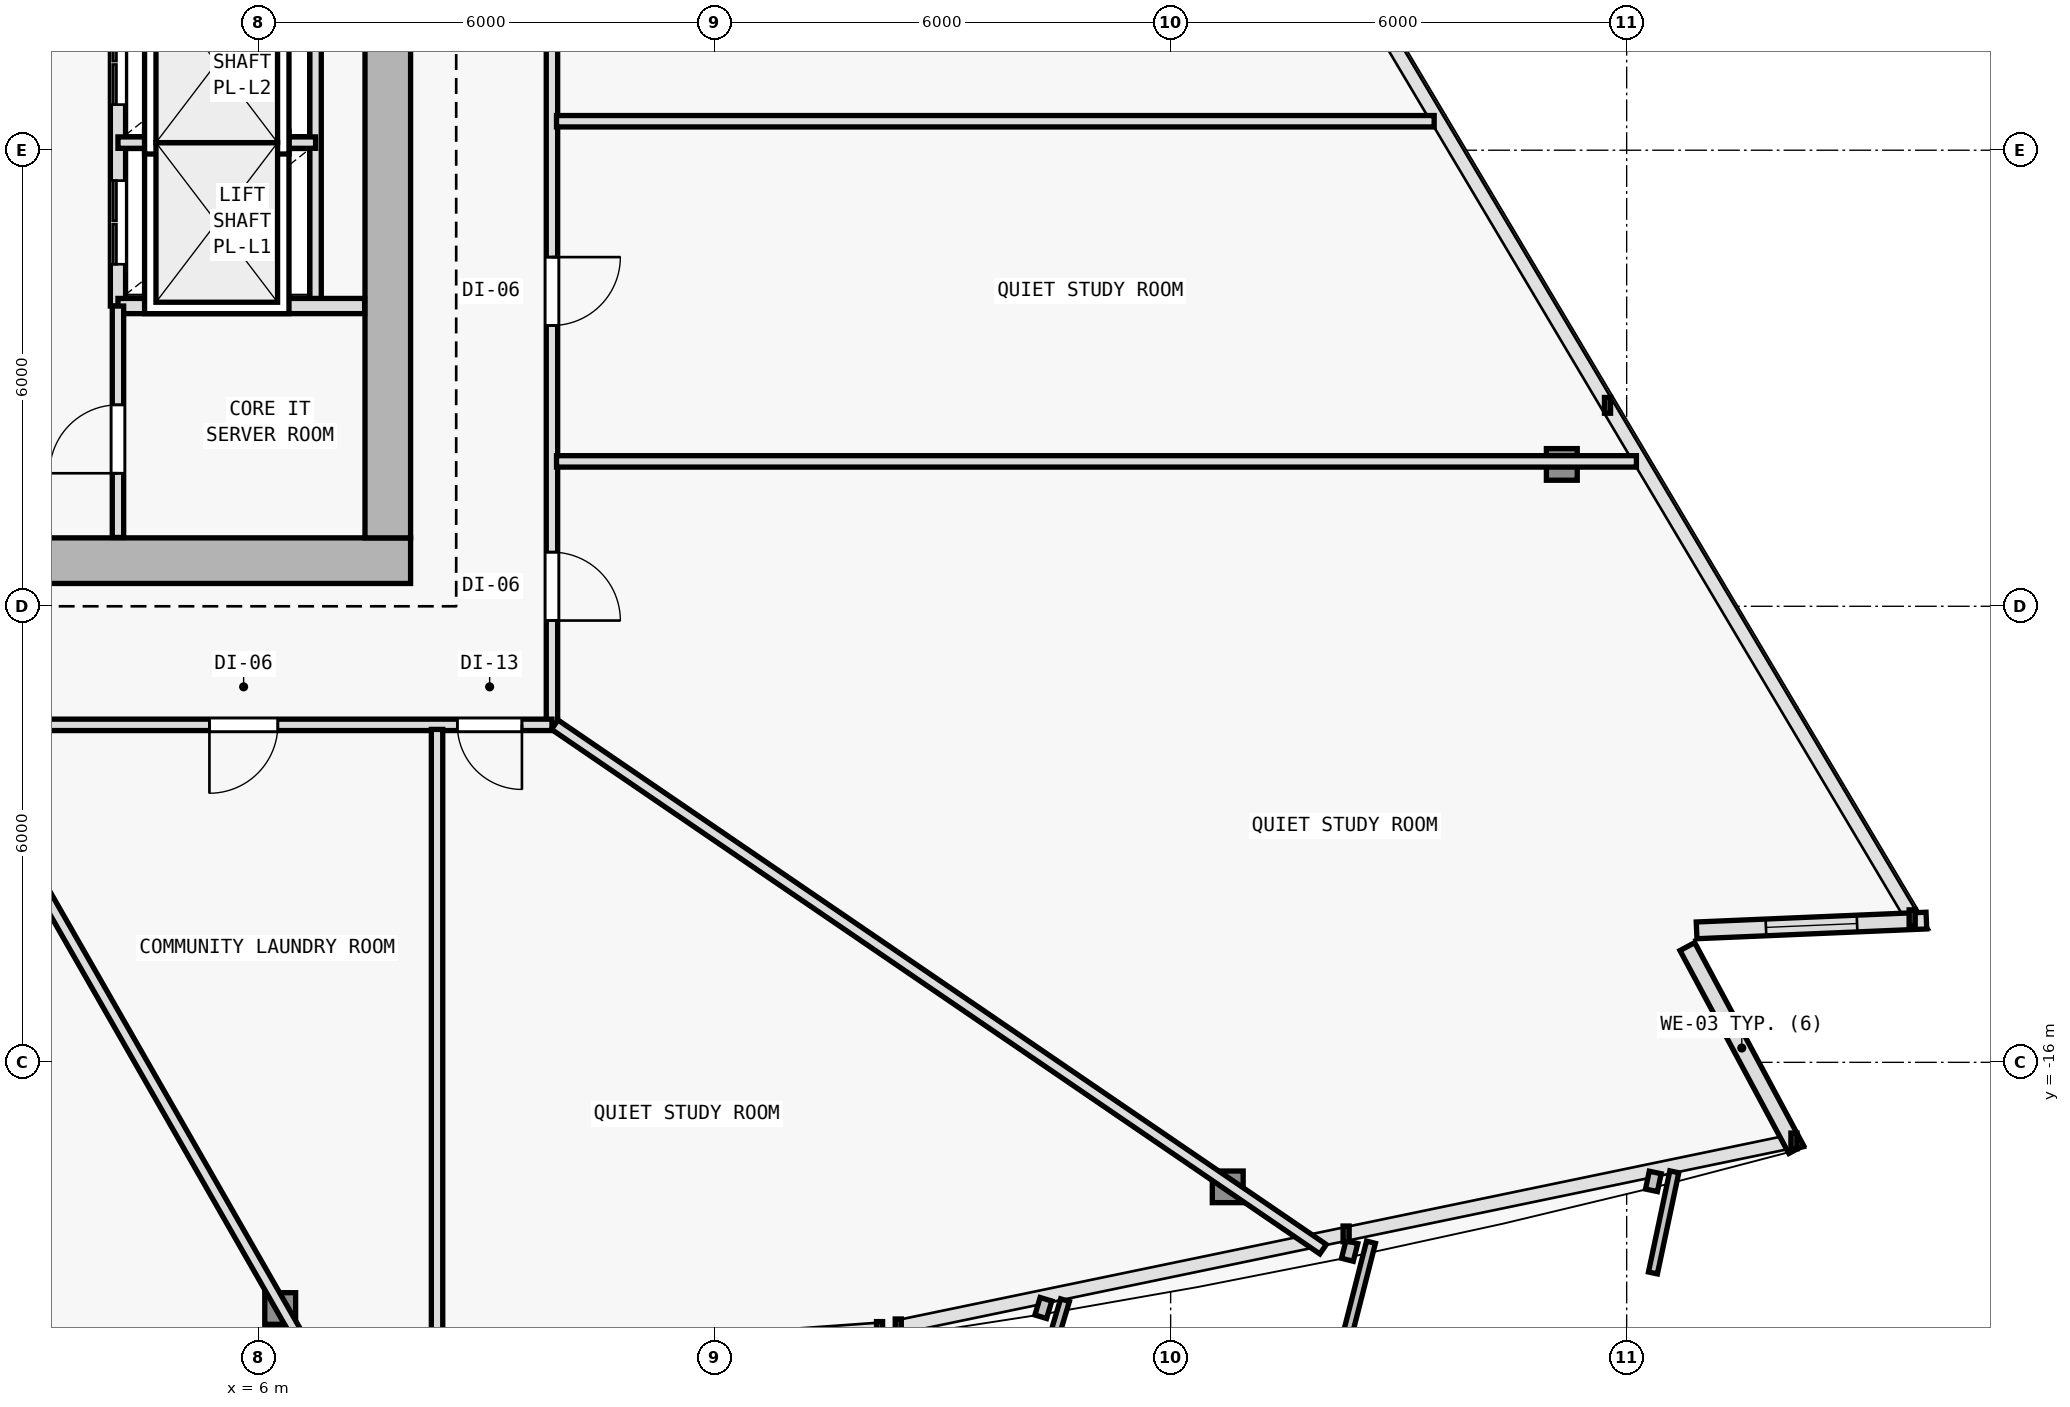
"""IFC4 building model, lengths in metres.
Left out: names, types, materials, properties, quantities, classifications, styles, units other than length and angle.
Written with IfcOpenShell. Run it as: python <this file> out.ifc"""

import sys

from ifc_helpers import new_model, si_unit, direction, frame, frame_2d, origin, origin_2d, place, context, subcontext, project, spatial, rectangle, i_section, extrude, element, fill, save


model = new_model("IFC4")
c1 = context("Model", 3, precision=1e-05, world=origin(), true_north=direction((0.0, 1.0)))
c2 = subcontext(c1, "Body", "Model", "MODEL_VIEW")
j1 = project(units=[si_unit("LENGTHUNIT", "METRE"), si_unit("PLANEANGLEUNIT", "RADIAN")], contexts=[c1])
p1 = place(None, origin())
s1 = spatial("IfcSite", under=j1, at=p1, CompositionType="ELEMENT")
p2 = place(p1, origin())
s2 = spatial("IfcBuilding", under=s1, at=p2, CompositionType="ELEMENT")
p3 = place(p2, frame((0.0, 0.0, 107.7)))
s3 = spatial("IfcBuildingStorey", under=s2, at=p3, CompositionType="ELEMENT", Elevation=107.7)
p4 = place(p3, frame((7.7, -9.4, 0.0), z_axis=(0.0, 0.0, 1.0), x_axis=(1.0, 0.0, 0.0)))
e1 = element("IfcColumn", 1, at=p4, inside=s3, PredefinedType="COLUMN", context=c2, shape_type="SweptSolid", body=[
    extrude(i_section(OverallWidth=0.409, OverallDepth=0.425, WebThickness=0.021, FlangeThickness=0.034, FilletRadius=0.015, at=origin_2d()), origin(), (0.0, 0.0, 1.0), 3.6),
])
p5 = place(p3, frame((6.284, -19.239, 0.006), z_axis=(-0.007070007243, 0.036233787122, 0.999318331498), x_axis=(-0.981490592026, -0.19151035942, 0.0)))
e2 = element("IfcColumn", 2, at=p5, inside=s3, PredefinedType="COLUMN", context=c2, shape_type="SweptSolid", body=[
    extrude(i_section(OverallWidth=0.406, OverallDepth=0.416, WebThickness=0.019, FlangeThickness=0.031, FilletRadius=0.015, at=origin_2d()), origin(), (0.0, 0.0, 1.0), 3.591),
])
p6 = place(p3, frame((18.751, -17.638, 0.006), z_axis=(-0.021207156454, 0.034393657583, 0.999183332944), x_axis=(-0.851195920716, -0.524848077596, 0.0)))
e3 = element("IfcColumn", 3, at=p6, inside=s3, PredefinedType="COLUMN", context=c2, shape_type="SweptSolid", body=[
    extrude(i_section(OverallWidth=0.406, OverallDepth=0.416, WebThickness=0.019, FlangeThickness=0.031, FilletRadius=0.015, at=origin_2d()), origin(), (0.0, 0.0, 1.0), 3.592),
])
p7 = place(p3, frame((23.147, -8.134, 0.006), z_axis=(-0.026854414067, 0.022231375696, 0.99939211843), x_axis=(-0.637687438134, -0.770295223434, 0.0)))
e4 = element("IfcColumn", 4, at=p7, inside=s3, PredefinedType="COLUMN", context=c2, shape_type="SweptSolid", body=[
    extrude(i_section(OverallWidth=0.406, OverallDepth=0.416, WebThickness=0.019, FlangeThickness=0.031, FilletRadius=0.015, at=origin_2d()), origin(), (0.0, 0.0, 1.0), 3.591),
])
p8 = place(p3, frame((24.798, -14.477, 0.0), z_axis=(0.0, 0.0, 1.0), x_axis=(0.472820757697, -0.881158629925, 0.0)))
e5 = element("IfcWall", 5, at=p8, inside=s3, PredefinedType="SOLIDWALL", context=c2, shape_type="SweptSolid", body=[
    extrude(rectangle(XDim=3.029, YDim=0.22, at=frame_2d((1.514, 0.0))), origin(), (0.0, 0.0, 1.0), 3.35),
])
p9 = place(p3, frame((27.943, -14.135, 0.0), z_axis=(0.0, 0.0, 1.0), x_axis=(-0.999095621918, -0.042519857284, 0.0)))
e6 = element("IfcWall", 6, at=p9, inside=s3, PredefinedType="SOLIDWALL", context=c2, shape_type="SweptSolid", body=[
    extrude(rectangle(XDim=3.026, YDim=0.22, at=frame_2d((1.513, 0.0))), origin(), (0.0, 0.0, 1.0), 3.35),
])
p10 = place(p9, frame((0.913, 0.0, 0.62)))
e7 = element("IfcOpeningElement", 7, at=p10, cuts=e6, PredefinedType="OPENING", context=c2, shape_type="SweptSolid", body=[
    extrude(rectangle(XDim=1.2, YDim=1.8, at=frame_2d((0.6, 0.9))), frame((0.0, 0.12, 0.0), z_axis=(0.0, -1.0, 0.0), x_axis=(1.0, 0.0, 0.0)), (0.0, 0.0, 1.0), 0.24),
])
p11 = place(p3, frame((-8.0, -9.4, 0.0), z_axis=(0.0, 0.0, 1.0), x_axis=(1.0, 0.0, 0.0)))
e8 = element("IfcWall", 8, at=p11, inside=s3, PredefinedType="SHEAR", context=c2, shape_type="SweptSolid", body=[
    extrude(rectangle(XDim=16.0, YDim=0.6, at=frame_2d((8.0, 0.0))), origin(), (0.0, 0.0, 1.0), 3.35),
])
p12 = place(p11, frame((9.65, 0.0, 0.0)))
e9 = element("IfcOpeningElement", 9, at=p12, cuts=e8, PredefinedType="OPENING", context=c2, shape_type="SweptSolid", body=[
    extrude(rectangle(XDim=1.5, YDim=2.2, at=frame_2d((0.75, 1.1))), frame((0.0, 0.31, 0.0), z_axis=(0.0, -1.0, 0.0), x_axis=(1.0, 0.0, 0.0)), (0.0, 0.0, 1.0), 0.62),
])
p13 = place(p3, frame((7.7, 9.9, 0.0), z_axis=(0.0, 0.0, 1.0), x_axis=(0.0, -1.0, 0.0)))
e10 = element("IfcWall", 10, at=p13, inside=s3, PredefinedType="SHEAR", context=c2, shape_type="SweptSolid", body=[
    extrude(rectangle(XDim=19.0, YDim=0.6, at=frame_2d((9.5, 0.0))), origin(), (0.0, 0.0, 1.0), 3.35),
])
p14 = place(p3, frame((4.15, -6.05, 0.0), z_axis=(0.0, 0.0, 1.0), x_axis=(0.0, 1.0, 0.0)))
e11 = element("IfcWall", 11, at=p14, inside=s3, PredefinedType="SOLIDWALL", context=c2, shape_type="SweptSolid", body=[
    extrude(rectangle(XDim=8.7, YDim=0.2, at=frame_2d((4.35, 0.0))), origin(), (0.0, 0.0, 1.0), 3.35),
])
p15 = place(p14, frame((0.55, 0.0, 0.0)))
e12 = element("IfcOpeningElement", 12, at=p15, cuts=e11, PredefinedType="OPENING", context=c2, shape_type="SweptSolid", body=[
    extrude(rectangle(XDim=1.1, YDim=2.15, at=frame_2d((0.55, 1.075))), frame((0.0, 0.11, 0.0), z_axis=(0.0, -1.0, 0.0), x_axis=(1.0, 0.0, 0.0)), (0.0, 0.0, 1.0), 0.22),
])
p16 = place(p14, frame((2.65, 0.0, 0.0)))
e13 = element("IfcOpeningElement", 13, at=p16, cuts=e11, PredefinedType="OPENING", context=c2, shape_type="SweptSolid", body=[
    extrude(rectangle(XDim=1.1, YDim=2.15, at=frame_2d((0.55, 1.075))), frame((0.0, 0.11, 0.0), z_axis=(0.0, -1.0, 0.0), x_axis=(1.0, 0.0, 0.0)), (0.0, 0.0, 1.0), 0.22),
])
p17 = place(p14, frame((4.75, 0.0, 0.0)))
e14 = element("IfcOpeningElement", 14, at=p17, cuts=e11, PredefinedType="OPENING", context=c2, shape_type="SweptSolid", body=[
    extrude(rectangle(XDim=1.1, YDim=2.15, at=frame_2d((0.55, 1.075))), frame((0.0, 0.11, 0.0), z_axis=(0.0, -1.0, 0.0), x_axis=(1.0, 0.0, 0.0)), (0.0, 0.0, 1.0), 0.22),
])
p18 = place(p14, frame((6.85, 0.0, 0.0)))
e15 = element("IfcOpeningElement", 15, at=p18, cuts=e11, PredefinedType="OPENING", context=c2, shape_type="SweptSolid", body=[
    extrude(rectangle(XDim=1.1, YDim=2.15, at=frame_2d((0.55, 1.075))), frame((0.0, 0.11, 0.0), z_axis=(0.0, -1.0, 0.0), x_axis=(1.0, 0.0, 0.0)), (0.0, 0.0, 1.0), 0.22),
])
p19 = place(p3, frame((6.75, -6.05, 0.0), z_axis=(0.0, 0.0, 1.0), x_axis=(0.0, 1.0, 0.0)))
e16 = element("IfcWall", 16, at=p19, inside=s3, PredefinedType="PARTITIONING", context=c2, shape_type="SweptSolid", body=[
    extrude(rectangle(XDim=8.7, YDim=0.15, at=frame_2d((4.35, 0.0))), origin(), (0.0, 0.0, 1.0), 3.35),
])
p20 = place(p3, frame((4.15, -3.9, 0.0), z_axis=(0.0, 0.0, 1.0), x_axis=(1.0, 0.0, 0.0)))
e17 = element("IfcWall", 17, at=p20, inside=s3, PredefinedType="PARTITIONING", context=c2, shape_type="SweptSolid", body=[
    extrude(rectangle(XDim=2.6, YDim=0.15, at=frame_2d((1.3, 0.0))), origin(), (0.0, 0.0, 1.0), 3.35),
])
p21 = place(p3, frame((4.15, -6.05, 0.0), z_axis=(0.0, 0.0, 1.0), x_axis=(1.0, 0.0, 0.0)))
e18 = element("IfcWall", 18, at=p21, inside=s3, PredefinedType="SOLIDWALL", context=c2, shape_type="SweptSolid", body=[
    extrude(rectangle(XDim=3.245, YDim=0.2, at=frame_2d((1.623, 0.0))), origin(), (0.0, 0.0, 1.0), 3.35),
])
p22 = place(p3, frame((4.15, -9.095, 0.0), z_axis=(0.0, 0.0, 1.0), x_axis=(0.0, 1.0, 0.0)))
e19 = element("IfcWall", 19, at=p22, inside=s3, PredefinedType="PARTITIONING", context=c2, shape_type="SweptSolid", body=[
    extrude(rectangle(XDim=3.045, YDim=0.15, at=frame_2d((1.522, 0.0))), origin(), (0.0, 0.0, 1.0), 3.35),
])
p23 = place(p22, frame((0.845, 0.0, 0.0)))
e20 = element("IfcOpeningElement", 20, at=p23, cuts=e19, PredefinedType="OPENING", context=c2, shape_type="SweptSolid", body=[
    extrude(rectangle(XDim=0.9, YDim=2.1, at=frame_2d((0.45, 1.05))), frame((0.0, 0.085, 0.0), z_axis=(0.0, -1.0, 0.0), x_axis=(1.0, 0.0, 0.0)), (0.0, 0.0, 1.0), 0.17),
])
p24 = place(p3, frame((9.86, 8.426, 0.0), z_axis=(0.0, 0.0, 1.0), x_axis=(0.0, -1.0, 0.0)))
e21 = element("IfcWall", 21, at=p24, inside=s3, PredefinedType="PARTITIONING", context=c2, shape_type="SweptSolid", body=[
    extrude(rectangle(XDim=19.986, YDim=0.15, at=frame_2d((9.993, 0.0))), origin(), (0.0, 0.0, 1.0), 2.705),
])
p25 = place(p24, frame((17.713, 0.0, 0.0)))
e22 = element("IfcOpeningElement", 22, at=p25, cuts=e21, PredefinedType="OPENING", context=c2, shape_type="SweptSolid", body=[
    extrude(rectangle(XDim=0.9, YDim=2.1, at=frame_2d((0.45, 1.05))), frame((0.0, 0.085, 0.0), z_axis=(0.0, -1.0, 0.0), x_axis=(1.0, 0.0, 0.0)), (0.0, 0.0, 1.0), 0.17),
])
p26 = place(p24, frame((13.832, 0.0, 0.0)))
e23 = element("IfcOpeningElement", 23, at=p26, cuts=e21, PredefinedType="OPENING", context=c2, shape_type="SweptSolid", body=[
    extrude(rectangle(XDim=0.9, YDim=2.1, at=frame_2d((0.45, 1.05))), frame((0.0, 0.085, 0.0), z_axis=(0.0, -1.0, 0.0), x_axis=(1.0, 0.0, 0.0)), (0.0, 0.0, 1.0), 0.17),
])
p27 = place(p24, frame((9.722, 0.0, 0.0)))
e24 = element("IfcOpeningElement", 24, at=p27, cuts=e21, PredefinedType="OPENING", context=c2, shape_type="SweptSolid", body=[
    extrude(rectangle(XDim=0.9, YDim=2.1, at=frame_2d((0.45, 1.05))), frame((0.0, 0.085, 0.0), z_axis=(0.0, -1.0, 0.0), x_axis=(1.0, 0.0, 0.0)), (0.0, 0.0, 1.0), 0.17),
])
p28 = place(p24, frame((5.796, 0.0, 0.0)))
e25 = element("IfcOpeningElement", 25, at=p28, cuts=e21, PredefinedType="OPENING", context=c2, shape_type="SweptSolid", body=[
    extrude(rectangle(XDim=0.9, YDim=2.1, at=frame_2d((0.45, 1.05))), frame((0.0, 0.085, 0.0), z_axis=(0.0, -1.0, 0.0), x_axis=(1.0, 0.0, 0.0)), (0.0, 0.0, 1.0), 0.17),
])
p29 = place(p24, frame((1.735, 0.0, 0.0)))
e26 = element("IfcOpeningElement", 26, at=p29, cuts=e21, PredefinedType="OPENING", context=c2, shape_type="SweptSolid", body=[
    extrude(rectangle(XDim=0.9, YDim=2.1, at=frame_2d((0.45, 1.05))), frame((0.0, 0.085, 0.0), z_axis=(0.0, -1.0, 0.0), x_axis=(1.0, 0.0, 0.0)), (0.0, 0.0, 1.0), 0.17),
])
p30 = place(p3, frame((9.86, -11.56, 0.0), z_axis=(0.0, 0.0, 1.0), x_axis=(-1.0, 0.0, 0.0)))
e27 = element("IfcWall", 27, at=p30, inside=s3, PredefinedType="PARTITIONING", context=c2, shape_type="SweptSolid", body=[
    extrude(rectangle(XDim=6.78, YDim=0.15, at=frame_2d((3.39, 0.0))), origin(), (0.0, 0.0, 1.0), 2.995),
])
p31 = place(p30, frame((3.607, 0.0, 0.0)))
e28 = element("IfcOpeningElement", 28, at=p31, cuts=e27, PredefinedType="OPENING", context=c2, shape_type="SweptSolid", body=[
    extrude(rectangle(XDim=0.9, YDim=2.1, at=frame_2d((0.45, 1.05))), frame((0.0, 0.085, 0.0), z_axis=(0.0, -1.0, 0.0), x_axis=(1.0, 0.0, 0.0)), (0.0, 0.0, 1.0), 0.17),
])
p32 = place(p30, frame((0.395, 0.0, 0.0)))
e29 = element("IfcOpeningElement", 29, at=p32, cuts=e27, PredefinedType="OPENING", context=c2, shape_type="SweptSolid", body=[
    extrude(rectangle(XDim=0.85, YDim=2.1, at=frame_2d((0.425, 1.05))), frame((0.0, 0.085, 0.0), z_axis=(0.0, -1.0, 0.0), x_axis=(1.0, 0.0, 0.0)), (0.0, 0.0, 1.0), 0.17),
])
p33 = place(p3, frame((3.066, -13.573, 0.0), z_axis=(0.0, 0.0, 1.0), x_axis=(0.496813094975, -0.867857562427, 0.0)))
e30 = element("IfcWall", 30, at=p33, inside=s3, PredefinedType="PARTITIONING", context=c2, shape_type="SweptSolid", body=[
    extrude(rectangle(XDim=7.681, YDim=0.15, at=frame_2d((3.841, 0.0))), origin(), (0.0, 0.0, 1.0), 2.775),
])
p34 = place(p3, frame((9.896, -11.558, 0.0), z_axis=(0.0, 0.0, 1.0), x_axis=(0.825927612639, -0.563776177822, 0.0)))
e31 = element("IfcWall", 31, at=p34, inside=s3, PredefinedType="PARTITIONING", context=c2, shape_type="SweptSolid", body=[
    extrude(rectangle(XDim=12.24, YDim=0.15, at=frame_2d((6.12, 0.0))), origin(), (0.0, 0.0, 1.0), 2.775),
])
p35 = place(p3, frame((9.92, -8.094, 0.0), z_axis=(0.0, 0.0, 1.0), x_axis=(1.0, 0.0, 0.0)))
e32 = element("IfcWall", 32, at=p35, inside=s3, PredefinedType="PARTITIONING", context=c2, shape_type="SweptSolid", body=[
    extrude(rectangle(XDim=14.208, YDim=0.15, at=frame_2d((7.104, 0.0))), origin(), (0.0, 0.0, 1.0), 2.705),
])
p36 = place(p3, frame((8.348, -11.62, 0.0), z_axis=(0.0, 0.0, 1.0), x_axis=(0.0, -1.0, 0.0)))
e33 = element("IfcWall", 33, at=p36, inside=s3, PredefinedType="PARTITIONING", context=c2, shape_type="SweptSolid", body=[
    extrude(rectangle(XDim=8.511, YDim=0.15, at=frame_2d((4.255, 0.0))), origin(), (0.0, 0.0, 1.0), 2.835),
])
p37 = place(p3, frame((9.92, -3.619, 0.0), z_axis=(0.0, 0.0, 1.0), x_axis=(1.0, 0.0, 0.0)))
e34 = element("IfcWall", 34, at=p37, inside=s3, PredefinedType="PARTITIONING", context=c2, shape_type="SweptSolid", body=[
    extrude(rectangle(XDim=11.547, YDim=0.15, at=frame_2d((5.774, 0.0))), origin(), (0.0, 0.0, 1.0), 2.725),
])
p38 = place(p10, origin())
e35 = element("IfcWindow", 35, at=p38, inside=s3, PartitioningType="SINGLE_PANEL", PredefinedType="WINDOW", context=c2, shape_type="SweptSolid", body=[
    extrude(rectangle(XDim=1.2, YDim=1.8, at=frame_2d((0.6, 0.9))), frame((0.0, 0.03, 0.0), z_axis=(0.0, -1.0, 0.0), x_axis=(1.0, 0.0, 0.0)), (0.0, 0.0, 1.0), 0.06),
])
fill(e7, e35)
p39 = place(p15, origin())
e36 = element("IfcDoor", 36, at=p39, inside=s3, OperationType="DOUBLE_DOOR_SLIDING", PredefinedType="DOOR", context=c2, shape_type="SweptSolid", body=[
    extrude(rectangle(XDim=1.1, YDim=2.15, at=frame_2d((0.55, 1.075))), frame((0.0, 0.025, 0.0), z_axis=(0.0, -1.0, 0.0), x_axis=(1.0, 0.0, 0.0)), (0.0, 0.0, 1.0), 0.05),
])
fill(e12, e36)
p40 = place(p16, origin())
e37 = element("IfcDoor", 37, at=p40, inside=s3, OperationType="DOUBLE_DOOR_SLIDING", PredefinedType="DOOR", context=c2, shape_type="SweptSolid", body=[
    extrude(rectangle(XDim=1.1, YDim=2.15, at=frame_2d((0.55, 1.075))), frame((0.0, 0.025, 0.0), z_axis=(0.0, -1.0, 0.0), x_axis=(1.0, 0.0, 0.0)), (0.0, 0.0, 1.0), 0.05),
])
fill(e13, e37)
p41 = place(p23, origin())
e38 = element("IfcDoor", 38, at=p41, inside=s3, OperationType="SINGLE_SWING_LEFT", PredefinedType="DOOR", context=c2, shape_type="SweptSolid", body=[
    extrude(rectangle(XDim=0.9, YDim=2.1, at=frame_2d((0.45, 1.05))), frame((0.0, 0.025, 0.0), z_axis=(0.0, -1.0, 0.0), x_axis=(1.0, 0.0, 0.0)), (0.0, 0.0, 1.0), 0.05),
])
fill(e20, e38)
p42 = place(p31, origin())
e39 = element("IfcDoor", 39, at=p42, inside=s3, OperationType="SINGLE_SWING_RIGHT", PredefinedType="DOOR", context=c2, shape_type="SweptSolid", body=[
    extrude(rectangle(XDim=0.9, YDim=2.1, at=frame_2d((0.45, 1.05))), frame((0.0, 0.025, 0.0), z_axis=(0.0, -1.0, 0.0), x_axis=(1.0, 0.0, 0.0)), (0.0, 0.0, 1.0), 0.05),
])
fill(e28, e39)
p43 = place(p32, origin())
e40 = element("IfcDoor", 40, at=p43, inside=s3, OperationType="SINGLE_SWING_LEFT", PredefinedType="DOOR", context=c2, shape_type="SweptSolid", body=[
    extrude(rectangle(XDim=0.85, YDim=2.1, at=frame_2d((0.425, 1.05))), frame((0.0, 0.025, 0.0), z_axis=(0.0, -1.0, 0.0), x_axis=(1.0, 0.0, 0.0)), (0.0, 0.0, 1.0), 0.05),
])
fill(e29, e40)
p44 = place(p25, origin())
e41 = element("IfcDoor", 41, at=p44, inside=s3, OperationType="SINGLE_SWING_RIGHT", PredefinedType="DOOR", context=c2, shape_type="SweptSolid", body=[
    extrude(rectangle(XDim=0.9, YDim=2.1, at=frame_2d((0.45, 1.05))), frame((0.0, 0.025, 0.0), z_axis=(0.0, -1.0, 0.0), x_axis=(1.0, 0.0, 0.0)), (0.0, 0.0, 1.0), 0.05),
])
fill(e22, e41)
p45 = place(p26, origin())
e42 = element("IfcDoor", 42, at=p45, inside=s3, OperationType="SINGLE_SWING_LEFT", PredefinedType="DOOR", context=c2, shape_type="SweptSolid", body=[
    extrude(rectangle(XDim=0.9, YDim=2.1, at=frame_2d((0.45, 1.05))), frame((0.0, 0.025, 0.0), z_axis=(0.0, -1.0, 0.0), x_axis=(1.0, 0.0, 0.0)), (0.0, 0.0, 1.0), 0.05),
])
fill(e23, e42)
save(model, sys.argv[1])
